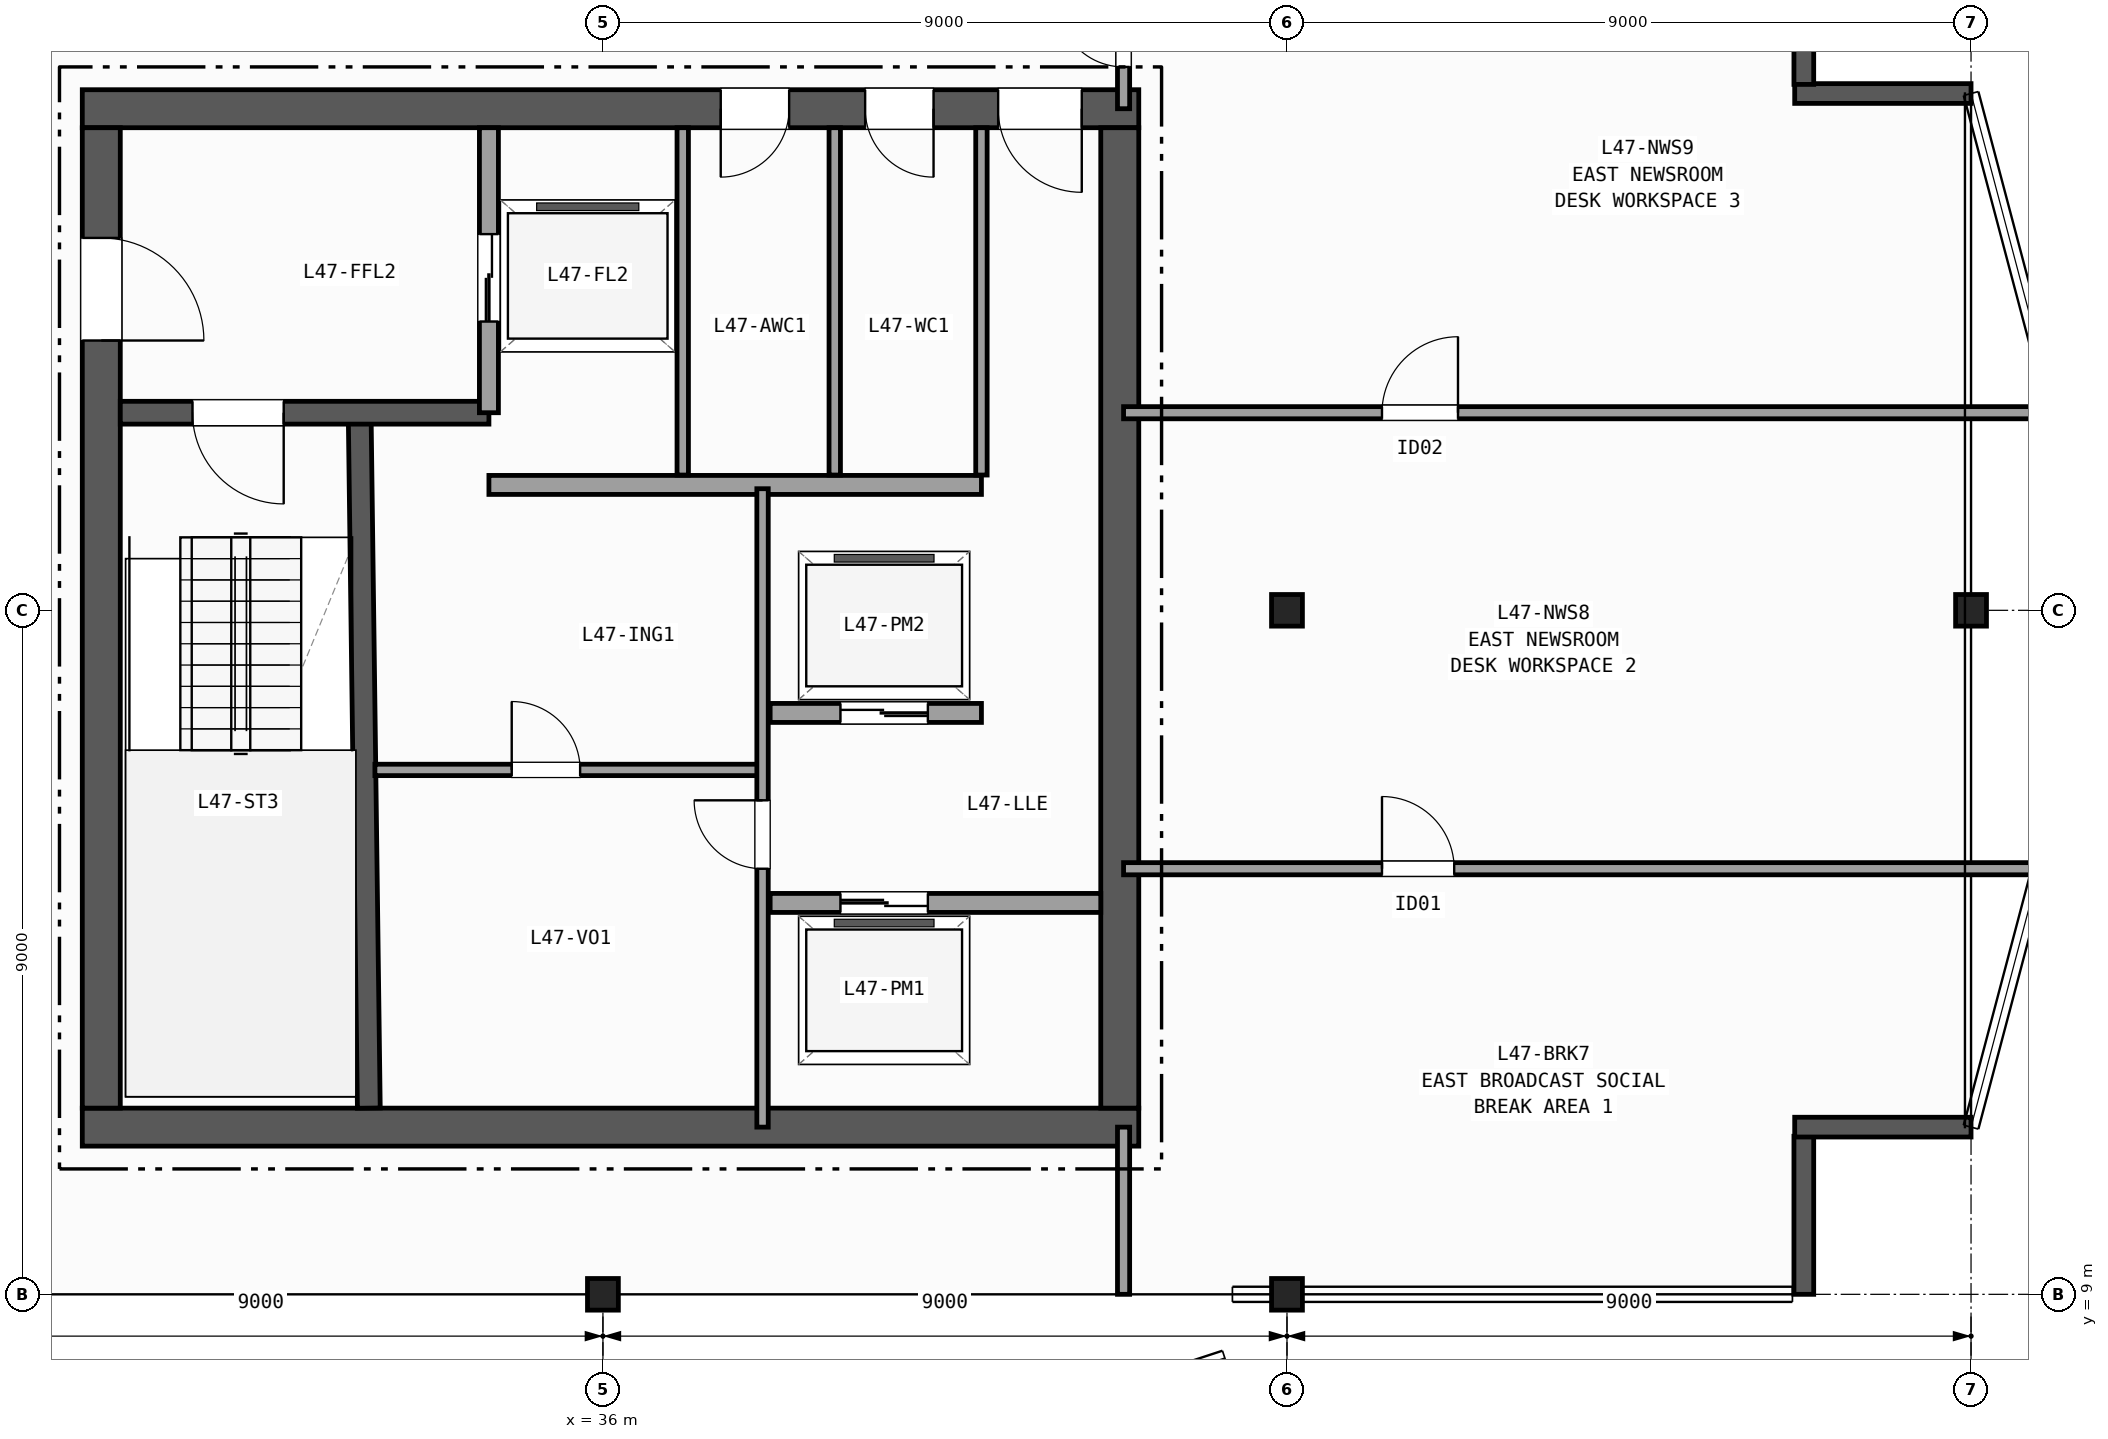
"""IFC4 building model, lengths in metres.
Left out: names, types, materials, properties, quantities, classifications, styles, units other than length and angle.
Written with IfcOpenShell. Run it as: python <this file> out.ifc"""

import sys

from ifc_helpers import new_model, si_unit, direction, frame, frame_2d, origin, origin_2d, place, context, subcontext, project, spatial, rectangle, i_section, extrude, element, fill, save


model = new_model("IFC4")
c1 = context("Model", 3, precision=1e-05, world=origin(), true_north=direction((0.0, 1.0)))
c2 = subcontext(c1, "Body", "Model", "MODEL_VIEW")
j1 = project(units=[si_unit("LENGTHUNIT", "METRE"), si_unit("PLANEANGLEUNIT", "RADIAN")], contexts=[c1])
p1 = place(None, origin())
s1 = spatial("IfcSite", under=j1, at=p1, CompositionType="ELEMENT")
p2 = place(p1, origin())
s2 = spatial("IfcBuilding", under=s1, at=p2, CompositionType="ELEMENT")
p3 = place(p2, frame((0.0, 0.0, 189.0)))
s3 = spatial("IfcBuildingStorey", under=s2, at=p3, CompositionType="ELEMENT", Elevation=189.0)
for number, where, z_axis, x_axis in (
    (1, (36.0, 9.0, 0.0), (0.0, 0.0, 1.0), (1.0, 0.0, 0.0)),
    (2, (45.0, 9.0, 0.0), (0.0, 0.0, 1.0), (1.0, 0.0, 0.0)),
    (3, (45.0, 18.0, 0.0), (0.0, 0.0, 1.0), (1.0, 0.0, 0.0)),
    (4, (54.0, 18.0, 0.0), (0.0, 0.0, 1.0), (1.0, 0.0, 0.0)),
):
    element("IfcColumn", number, at=place(p3, frame(where, z_axis=z_axis, x_axis=x_axis)), inside=s3, PredefinedType="COLUMN", context=c2, shape_type="SweptSolid", body=[
        extrude(i_section(OverallWidth=0.406, OverallDepth=0.416, WebThickness=0.03, FlangeThickness=0.048, FilletRadius=0.015, at=origin_2d()), origin(), (0.0, 0.0, 1.0), 3.7),
    ])
p4 = place(p3, frame((51.8, 9.0, 0.0), z_axis=(0.0, 0.0, 1.0), x_axis=(0.0, 1.0, 0.0)))
e5 = element("IfcWall", 5, at=p4, inside=s3, PredefinedType="SOLIDWALL", context=c2, shape_type="SweptSolid", body=[
    extrude(rectangle(XDim=2.08, YDim=0.26, at=frame_2d((1.04, 0.0))), origin(), (0.0, 0.0, 1.0), 3.42),
])
for number, where, z_axis, x_axis in (
    (6, (51.68, 11.2, 0.0), (0.0, 0.0, 1.0), (1.0, 0.0, 0.0)),
    (7, (54.0, 24.8, 0.0), (0.0, 0.0, 1.0), (-1.0, 0.0, 0.0)),
):
    element("IfcWall", number, at=place(p3, frame(where, z_axis=z_axis, x_axis=x_axis)), inside=s3, PredefinedType="SOLIDWALL", context=c2, shape_type="SweptSolid", body=[
        extrude(rectangle(XDim=2.32, YDim=0.26, at=frame_2d((1.16, 0.0))), origin(), (0.0, 0.0, 1.0), 3.42),
    ])
p5 = place(p3, frame((51.8, 24.92, 0.0), z_axis=(0.0, 0.0, 1.0), x_axis=(0.0, 1.0, 0.0)))
e8 = element("IfcWall", 8, at=p5, inside=s3, PredefinedType="SOLIDWALL", context=c2, shape_type="SweptSolid", body=[
    extrude(rectangle(XDim=2.08, YDim=0.26, at=frame_2d((1.04, 0.0))), origin(), (0.0, 0.0, 1.0), 3.42),
])
p6 = place(p3, frame((29.15, 11.2, 0.0), z_axis=(0.0, 0.0, 1.0), x_axis=(1.0, 0.0, 0.0)))
e9 = element("IfcWall", 9, at=p6, inside=s3, PredefinedType="SHEAR", context=c2, shape_type="SweptSolid", body=[
    extrude(rectangle(XDim=13.9, YDim=0.5, at=frame_2d((6.95, 0.0))), origin(), (0.0, 0.0, 1.0), 3.42),
])
p7 = place(p3, frame((43.05, 24.6, 0.0), z_axis=(0.0, 0.0, 1.0), x_axis=(-1.0, 0.0, 0.0)))
e10 = element("IfcWall", 10, at=p7, inside=s3, PredefinedType="SHEAR", context=c2, shape_type="SweptSolid", body=[
    extrude(rectangle(XDim=13.9, YDim=0.5, at=frame_2d((6.95, 0.0))), origin(), (0.0, 0.0, 1.0), 3.42),
])
p8 = place(p7, frame((0.75, 0.0, 0.0)))
e11 = element("IfcOpeningElement", 11, at=p8, cuts=e10, PredefinedType="OPENING", context=c2, shape_type="SweptSolid", body=[
    extrude(rectangle(XDim=1.1, YDim=2.15, at=frame_2d((0.55, 1.075))), frame((0.0, 0.26, 0.0), z_axis=(0.0, -1.0, 0.0), x_axis=(1.0, 0.0, 0.0)), (0.0, 0.0, 1.0), 0.52),
])
p9 = place(p7, frame((2.7, 0.0, 0.0)))
e12 = element("IfcOpeningElement", 12, at=p9, cuts=e10, PredefinedType="OPENING", context=c2, shape_type="SweptSolid", body=[
    extrude(rectangle(XDim=0.9, YDim=2.1, at=frame_2d((0.45, 1.05))), frame((0.0, 0.26, 0.0), z_axis=(0.0, -1.0, 0.0), x_axis=(1.0, 0.0, 0.0)), (0.0, 0.0, 1.0), 0.52),
])
p10 = place(p7, frame((4.6, 0.0, 0.0)))
e13 = element("IfcOpeningElement", 13, at=p10, cuts=e10, PredefinedType="OPENING", context=c2, shape_type="SweptSolid", body=[
    extrude(rectangle(XDim=0.9, YDim=2.1, at=frame_2d((0.45, 1.05))), frame((0.0, 0.26, 0.0), z_axis=(0.0, -1.0, 0.0), x_axis=(1.0, 0.0, 0.0)), (0.0, 0.0, 1.0), 0.52),
])
p11 = place(p3, frame((29.4, 24.35, 0.0), z_axis=(0.0, 0.0, 1.0), x_axis=(0.0, -1.0, 0.0)))
e14 = element("IfcWall", 14, at=p11, inside=s3, PredefinedType="SHEAR", context=c2, shape_type="SweptSolid", body=[
    extrude(rectangle(XDim=12.9, YDim=0.5, at=frame_2d((6.45, 0.0))), origin(), (0.0, 0.0, 1.0), 3.42),
])
p12 = place(p11, frame((1.45, 0.0, 0.0)))
e15 = element("IfcOpeningElement", 15, at=p12, cuts=e14, PredefinedType="OPENING", context=c2, shape_type="SweptSolid", body=[
    extrude(rectangle(XDim=1.35, YDim=2.15, at=frame_2d((0.675, 1.075))), frame((0.0, 0.26, 0.0), z_axis=(0.0, -1.0, 0.0), x_axis=(1.0, 0.0, 0.0)), (0.0, 0.0, 1.0), 0.52),
])
p13 = place(p3, frame((42.8, 11.45, 0.0), z_axis=(0.0, 0.0, 1.0), x_axis=(0.0, 1.0, 0.0)))
e16 = element("IfcWall", 16, at=p13, inside=s3, PredefinedType="SHEAR", context=c2, shape_type="SweptSolid", body=[
    extrude(rectangle(XDim=12.9, YDim=0.5, at=frame_2d((6.45, 0.0))), origin(), (0.0, 0.0, 1.0), 3.42),
])
p14 = place(p3, frame((32.92, 11.45, 0.0), z_axis=(0.0, 0.0, 1.0), x_axis=(-0.013171578211, 0.999913251001, 0.0)))
e17 = element("IfcWall", 17, at=p14, inside=s3, PredefinedType="SHEAR", context=c2, shape_type="SweptSolid", body=[
    extrude(rectangle(XDim=9.101, YDim=0.3, at=frame_2d((4.55, 0.0))), origin(), (0.0, 0.0, 1.0), 3.42),
])
p15 = place(p3, frame((34.5, 20.6, 0.0), z_axis=(0.0, 0.0, 1.0), x_axis=(-1.0, 0.0, 0.0)))
e18 = element("IfcWall", 18, at=p15, inside=s3, PredefinedType="SHEAR", context=c2, shape_type="SweptSolid", body=[
    extrude(rectangle(XDim=4.85, YDim=0.3, at=frame_2d((2.425, 0.0))), origin(), (0.0, 0.0, 1.0), 3.42),
])
p16 = place(p15, frame((2.7, 0.0, 0.0)))
e19 = element("IfcOpeningElement", 19, at=p16, cuts=e18, PredefinedType="OPENING", context=c2, shape_type="SweptSolid", body=[
    extrude(rectangle(XDim=1.2, YDim=2.15, at=frame_2d((0.6, 1.075))), frame((0.0, 0.16, 0.0), z_axis=(0.0, -1.0, 0.0), x_axis=(1.0, 0.0, 0.0)), (0.0, 0.0, 1.0), 0.32),
])
p17 = place(p3, frame((34.5, 20.6, 0.0), z_axis=(0.0, 0.0, 1.0), x_axis=(0.0, 1.0, 0.0)))
e20 = element("IfcWall", 20, at=p17, inside=s3, PredefinedType="PARTITIONING", context=c2, shape_type="SweptSolid", body=[
    extrude(rectangle(XDim=3.75, YDim=0.25, at=frame_2d((1.875, 0.0))), origin(), (0.0, 0.0, 1.0), 3.42),
])
p18 = place(p17, frame((1.2, 0.0, 0.0)))
e21 = element("IfcOpeningElement", 21, at=p18, cuts=e20, PredefinedType="OPENING", context=c2, shape_type="SweptSolid", body=[
    extrude(rectangle(XDim=1.15, YDim=2.15, at=frame_2d((0.575, 1.075))), frame((0.0, 0.135, 0.0), z_axis=(0.0, -1.0, 0.0), x_axis=(1.0, 0.0, 0.0)), (0.0, 0.0, 1.0), 0.27),
])
p19 = place(p3, frame((34.5, 19.65, 0.0), z_axis=(0.0, 0.0, 1.0), x_axis=(1.0, 0.0, 0.0)))
e22 = element("IfcWall", 22, at=p19, inside=s3, PredefinedType="PARTITIONING", context=c2, shape_type="SweptSolid", body=[
    extrude(rectangle(XDim=6.48, YDim=0.25, at=frame_2d((3.24, 0.0))), origin(), (0.0, 0.0, 1.0), 3.42),
])
p20 = place(p3, frame((38.2, 14.15, 0.0), z_axis=(0.0, 0.0, 1.0), x_axis=(1.0, 0.0, 0.0)))
e23 = element("IfcWall", 23, at=p20, inside=s3, PredefinedType="PARTITIONING", context=c2, shape_type="SweptSolid", body=[
    extrude(rectangle(XDim=4.35, YDim=0.25, at=frame_2d((2.175, 0.0))), origin(), (0.0, 0.0, 1.0), 3.42),
])
p21 = place(p20, frame((0.925, 0.0, 0.0)))
e24 = element("IfcOpeningElement", 24, at=p21, cuts=e23, PredefinedType="OPENING", context=c2, shape_type="SweptSolid", body=[
    extrude(rectangle(XDim=1.15, YDim=2.15, at=frame_2d((0.575, 1.075))), frame((0.0, 0.135, 0.0), z_axis=(0.0, -1.0, 0.0), x_axis=(1.0, 0.0, 0.0)), (0.0, 0.0, 1.0), 0.27),
])
p22 = place(p3, frame((40.98, 16.65, 0.0), z_axis=(0.0, 0.0, 1.0), x_axis=(-1.0, 0.0, 0.0)))
e25 = element("IfcWall", 25, at=p22, inside=s3, PredefinedType="PARTITIONING", context=c2, shape_type="SweptSolid", body=[
    extrude(rectangle(XDim=2.78, YDim=0.25, at=frame_2d((1.39, 0.0))), origin(), (0.0, 0.0, 1.0), 3.42),
])
p23 = place(p22, frame((0.705, 0.0, 0.0)))
e26 = element("IfcOpeningElement", 26, at=p23, cuts=e25, PredefinedType="OPENING", context=c2, shape_type="SweptSolid", body=[
    extrude(rectangle(XDim=1.15, YDim=2.15, at=frame_2d((0.575, 1.075))), frame((0.0, 0.135, 0.0), z_axis=(0.0, -1.0, 0.0), x_axis=(1.0, 0.0, 0.0)), (0.0, 0.0, 1.0), 0.27),
])
p24 = place(p3, frame((33.0, 15.9, 0.0), z_axis=(0.0, 0.0, 1.0), x_axis=(1.0, 0.0, 0.0)))
e27 = element("IfcWall", 27, at=p24, inside=s3, PredefinedType="PARTITIONING", context=c2, shape_type="SweptSolid", body=[
    extrude(rectangle(XDim=5.1, YDim=0.15, at=frame_2d((2.55, 0.0))), origin(), (0.0, 0.0, 1.0), 3.42),
])
p25 = place(p24, frame((1.8, 0.0, 0.0)))
e28 = element("IfcOpeningElement", 28, at=p25, cuts=e27, PredefinedType="OPENING", context=c2, shape_type="SweptSolid", body=[
    extrude(rectangle(XDim=0.9, YDim=2.1, at=frame_2d((0.45, 1.05))), frame((0.0, 0.085, 0.0), z_axis=(0.0, -1.0, 0.0), x_axis=(1.0, 0.0, 0.0)), (0.0, 0.0, 1.0), 0.17),
])
p26 = place(p3, frame((38.1, 11.2, 0.0), z_axis=(0.0, 0.0, 1.0), x_axis=(0.0, 1.0, 0.0)))
e29 = element("IfcWall", 29, at=p26, inside=s3, PredefinedType="PARTITIONING", context=c2, shape_type="SweptSolid", body=[
    extrude(rectangle(XDim=8.4, YDim=0.15, at=frame_2d((4.2, 0.0))), origin(), (0.0, 0.0, 1.0), 3.42),
])
p27 = place(p26, frame((3.4, 0.0, 0.0)))
e30 = element("IfcOpeningElement", 30, at=p27, cuts=e29, PredefinedType="OPENING", context=c2, shape_type="SweptSolid", body=[
    extrude(rectangle(XDim=0.9, YDim=2.1, at=frame_2d((0.45, 1.05))), frame((0.0, 0.085, 0.0), z_axis=(0.0, -1.0, 0.0), x_axis=(1.0, 0.0, 0.0)), (0.0, 0.0, 1.0), 0.17),
])
for number, where, z_axis, x_axis in (
    (31, (37.05, 19.78, 0.0), (0.0, 0.0, 1.0), (0.0, 1.0, 0.0)),
    (32, (39.05, 19.78, 0.0), (0.0, 0.0, 1.0), (0.0, 1.0, 0.0)),
    (33, (40.98, 19.78, 0.0), (0.0, 0.0, 1.0), (0.0, 1.0, 0.0)),
):
    element("IfcWall", number, at=place(p3, frame(where, z_axis=z_axis, x_axis=x_axis)), inside=s3, PredefinedType="PARTITIONING", context=c2, shape_type="SweptSolid", body=[
        extrude(rectangle(XDim=4.57, YDim=0.15, at=frame_2d((2.285, 0.0))), origin(), (0.0, 0.0, 1.0), 3.42),
    ])
p28 = place(p3, frame((42.85, 9.0, 0.0), z_axis=(0.0, 0.0, 1.0), x_axis=(0.0, 1.0, 0.0)))
e34 = element("IfcWall", 34, at=p28, inside=s3, PredefinedType="PARTITIONING", context=c2, shape_type="SweptSolid", body=[
    extrude(rectangle(XDim=2.2, YDim=0.16, at=frame_2d((1.1, 0.0))), origin(), (0.0, 0.0, 1.0), 2.634),
])
p29 = place(p3, frame((42.85, 24.6, 0.0), z_axis=(0.0, 0.0, 1.0), x_axis=(0.0, 1.0, 0.0)))
e35 = element("IfcWall", 35, at=p29, inside=s3, PredefinedType="PARTITIONING", context=c2, shape_type="SweptSolid", body=[
    extrude(rectangle(XDim=2.4, YDim=0.16, at=frame_2d((1.2, 0.0))), origin(), (0.0, 0.0, 1.0), 2.634),
])
p30 = place(p29, frame((0.55, 0.0, 0.0)))
e36 = element("IfcOpeningElement", 36, at=p30, cuts=e35, PredefinedType="OPENING", context=c2, shape_type="SweptSolid", body=[
    extrude(rectangle(XDim=0.86, YDim=2.05, at=frame_2d((0.43, 1.025))), frame((0.0, 0.09, 0.0), z_axis=(0.0, -1.0, 0.0), x_axis=(1.0, 0.0, 0.0)), (0.0, 0.0, 1.0), 0.18),
])
p31 = place(p3, frame((42.85, 14.6, 0.0), z_axis=(0.0, 0.0, 1.0), x_axis=(1.0, 0.0, 0.0)))
e37 = element("IfcWall", 37, at=p31, inside=s3, PredefinedType="PARTITIONING", context=c2, shape_type="SweptSolid", body=[
    extrude(rectangle(XDim=12.05, YDim=0.16, at=frame_2d((6.025, 0.0))), origin(), (0.0, 0.0, 1.0), 3.42),
])
p32 = place(p31, frame((3.4, 0.0, 0.0)))
e38 = element("IfcOpeningElement", 38, at=p32, cuts=e37, PredefinedType="OPENING", context=c2, shape_type="SweptSolid", body=[
    extrude(rectangle(XDim=0.95, YDim=2.1, at=frame_2d((0.475, 1.05))), frame((0.0, 0.09, 0.0), z_axis=(0.0, -1.0, 0.0), x_axis=(1.0, 0.0, 0.0)), (0.0, 0.0, 1.0), 0.18),
])
p33 = place(p3, frame((42.85, 20.6, 0.0), z_axis=(0.0, 0.0, 1.0), x_axis=(1.0, 0.0, 0.0)))
e39 = element("IfcWall", 39, at=p33, inside=s3, PredefinedType="PARTITIONING", context=c2, shape_type="SweptSolid", body=[
    extrude(rectangle(XDim=12.262, YDim=0.16, at=frame_2d((6.131, 0.0))), origin(), (0.0, 0.0, 1.0), 3.42),
])
p34 = place(p33, frame((3.4, 0.0, 0.0)))
e40 = element("IfcOpeningElement", 40, at=p34, cuts=e39, PredefinedType="OPENING", context=c2, shape_type="SweptSolid", body=[
    extrude(rectangle(XDim=1.0, YDim=2.1, at=frame_2d((0.5, 1.05))), frame((0.0, 0.09, 0.0), z_axis=(0.0, -1.0, 0.0), x_axis=(1.0, 0.0, 0.0)), (0.0, 0.0, 1.0), 0.18),
])
p35 = place(p16, origin())
e41 = element("IfcDoor", 41, at=p35, inside=s3, OperationType="SINGLE_SWING_LEFT", PredefinedType="DOOR", context=c2, shape_type="SweptSolid", body=[
    extrude(rectangle(XDim=1.2, YDim=2.15, at=frame_2d((0.6, 1.075))), frame((0.0, 0.025, 0.0), z_axis=(0.0, -1.0, 0.0), x_axis=(1.0, 0.0, 0.0)), (0.0, 0.0, 1.0), 0.05),
])
fill(e19, e41)
p36 = place(p12, origin())
e42 = element("IfcDoor", 42, at=p36, inside=s3, OperationType="SINGLE_SWING_RIGHT", PredefinedType="DOOR", context=c2, shape_type="SweptSolid", body=[
    extrude(rectangle(XDim=1.35, YDim=2.15, at=frame_2d((0.675, 1.075))), frame((0.0, 0.025, 0.0), z_axis=(0.0, -1.0, 0.0), x_axis=(1.0, 0.0, 0.0)), (0.0, 0.0, 1.0), 0.05),
])
fill(e15, e42)
p37 = place(p8, origin())
e43 = element("IfcDoor", 43, at=p37, inside=s3, OperationType="SINGLE_SWING_LEFT", PredefinedType="DOOR", context=c2, shape_type="SweptSolid", body=[
    extrude(rectangle(XDim=1.1, YDim=2.15, at=frame_2d((0.55, 1.075))), frame((0.0, 0.025, 0.0), z_axis=(0.0, -1.0, 0.0), x_axis=(1.0, 0.0, 0.0)), (0.0, 0.0, 1.0), 0.05),
])
fill(e11, e43)
p38 = place(p9, origin())
e44 = element("IfcDoor", 44, at=p38, inside=s3, OperationType="SINGLE_SWING_LEFT", PredefinedType="DOOR", context=c2, shape_type="SweptSolid", body=[
    extrude(rectangle(XDim=0.9, YDim=2.1, at=frame_2d((0.45, 1.05))), frame((0.0, 0.025, 0.0), z_axis=(0.0, -1.0, 0.0), x_axis=(1.0, 0.0, 0.0)), (0.0, 0.0, 1.0), 0.05),
])
fill(e12, e44)
p39 = place(p10, origin())
e45 = element("IfcDoor", 45, at=p39, inside=s3, OperationType="SINGLE_SWING_RIGHT", PredefinedType="DOOR", context=c2, shape_type="SweptSolid", body=[
    extrude(rectangle(XDim=0.9, YDim=2.1, at=frame_2d((0.45, 1.05))), frame((0.0, 0.025, 0.0), z_axis=(0.0, -1.0, 0.0), x_axis=(1.0, 0.0, 0.0)), (0.0, 0.0, 1.0), 0.05),
])
fill(e13, e45)
p40 = place(p18, origin())
e46 = element("IfcDoor", 46, at=p40, inside=s3, OperationType="DOUBLE_DOOR_SLIDING", PredefinedType="DOOR", context=c2, shape_type="SweptSolid", body=[
    extrude(rectangle(XDim=1.15, YDim=2.15, at=frame_2d((0.575, 1.075))), frame((0.0, 0.025, 0.0), z_axis=(0.0, -1.0, 0.0), x_axis=(1.0, 0.0, 0.0)), (0.0, 0.0, 1.0), 0.05),
])
fill(e21, e46)
p41 = place(p21, origin())
e47 = element("IfcDoor", 47, at=p41, inside=s3, OperationType="DOUBLE_DOOR_SLIDING", PredefinedType="DOOR", context=c2, shape_type="SweptSolid", body=[
    extrude(rectangle(XDim=1.15, YDim=2.15, at=frame_2d((0.575, 1.075))), frame((0.0, 0.025, 0.0), z_axis=(0.0, -1.0, 0.0), x_axis=(1.0, 0.0, 0.0)), (0.0, 0.0, 1.0), 0.05),
])
fill(e24, e47)
p42 = place(p23, origin())
e48 = element("IfcDoor", 48, at=p42, inside=s3, OperationType="DOUBLE_DOOR_SLIDING", PredefinedType="DOOR", context=c2, shape_type="SweptSolid", body=[
    extrude(rectangle(XDim=1.15, YDim=2.15, at=frame_2d((0.575, 1.075))), frame((0.0, 0.025, 0.0), z_axis=(0.0, -1.0, 0.0), x_axis=(1.0, 0.0, 0.0)), (0.0, 0.0, 1.0), 0.05),
])
fill(e26, e48)
p43 = place(p27, origin())
e49 = element("IfcDoor", 49, at=p43, inside=s3, OperationType="SINGLE_SWING_RIGHT", PredefinedType="DOOR", context=c2, shape_type="SweptSolid", body=[
    extrude(rectangle(XDim=0.9, YDim=2.1, at=frame_2d((0.45, 1.05))), frame((0.0, 0.025, 0.0), z_axis=(0.0, -1.0, 0.0), x_axis=(1.0, 0.0, 0.0)), (0.0, 0.0, 1.0), 0.05),
])
fill(e30, e49)
p44 = place(p25, origin())
e50 = element("IfcDoor", 50, at=p44, inside=s3, OperationType="SINGLE_SWING_LEFT", PredefinedType="DOOR", context=c2, shape_type="SweptSolid", body=[
    extrude(rectangle(XDim=0.9, YDim=2.1, at=frame_2d((0.45, 1.05))), frame((0.0, 0.025, 0.0), z_axis=(0.0, -1.0, 0.0), x_axis=(1.0, 0.0, 0.0)), (0.0, 0.0, 1.0), 0.05),
])
fill(e28, e50)
p45 = place(p30, origin())
e51 = element("IfcDoor", 51, at=p45, inside=s3, OperationType="SINGLE_SWING_RIGHT", PredefinedType="DOOR", context=c2, shape_type="SweptSolid", body=[
    extrude(rectangle(XDim=0.86, YDim=2.05, at=frame_2d((0.43, 1.025))), frame((0.0, 0.025, 0.0), z_axis=(0.0, -1.0, 0.0), x_axis=(1.0, 0.0, 0.0)), (0.0, 0.0, 1.0), 0.05),
])
fill(e36, e51)
p46 = place(p32, origin())
e52 = element("IfcDoor", 52, at=p46, inside=s3, OperationType="SINGLE_SWING_LEFT", PredefinedType="DOOR", context=c2, shape_type="SweptSolid", body=[
    extrude(rectangle(XDim=0.95, YDim=2.1, at=frame_2d((0.475, 1.05))), frame((0.0, 0.025, 0.0), z_axis=(0.0, -1.0, 0.0), x_axis=(1.0, 0.0, 0.0)), (0.0, 0.0, 1.0), 0.05),
])
fill(e38, e52)
p47 = place(p34, origin())
e53 = element("IfcDoor", 53, at=p47, inside=s3, OperationType="SINGLE_SWING_RIGHT", PredefinedType="DOOR", context=c2, shape_type="SweptSolid", body=[
    extrude(rectangle(XDim=1.0, YDim=2.1, at=frame_2d((0.5, 1.05))), frame((0.0, 0.025, 0.0), z_axis=(0.0, -1.0, 0.0), x_axis=(1.0, 0.0, 0.0)), (0.0, 0.0, 1.0), 0.05),
])
fill(e40, e53)
save(model, sys.argv[1])
